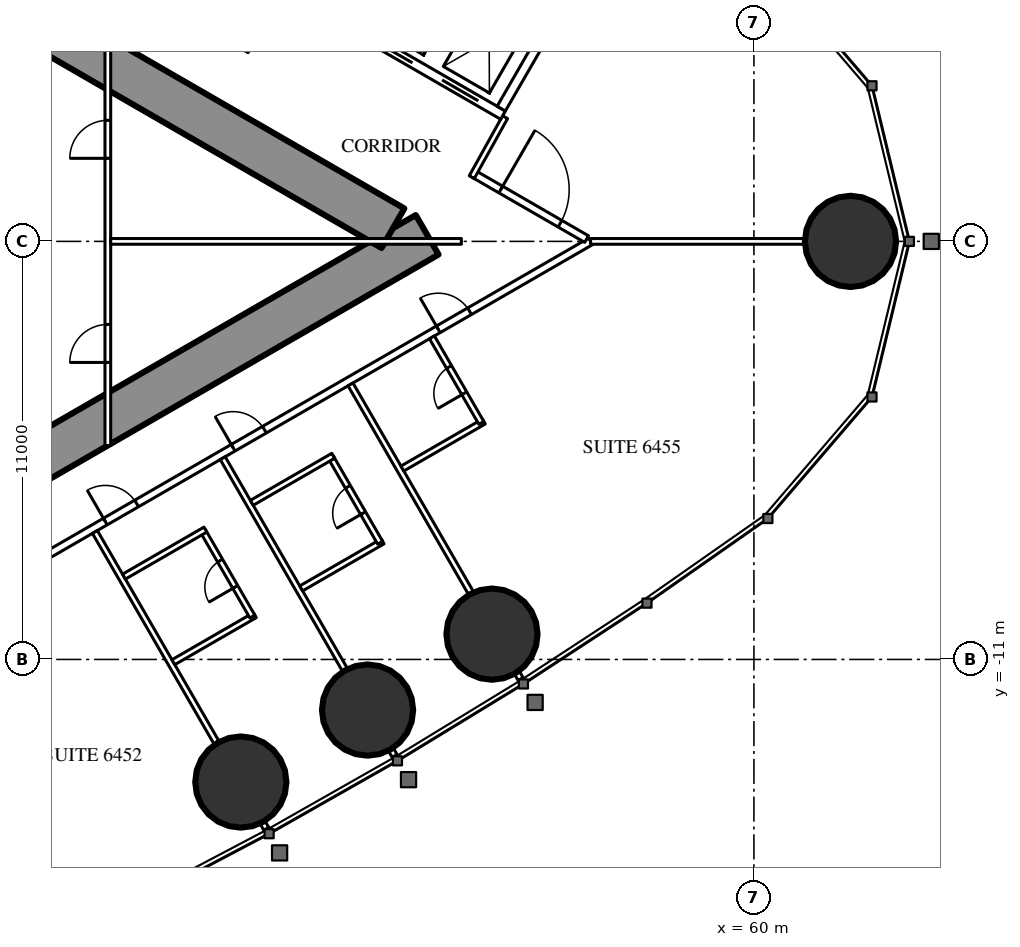
"""IFC4 building model, lengths in metres.
Left out: names, types, materials, properties, quantities, classifications, styles, units other than length and angle.
Written with IfcOpenShell. Run it as: python <this file> out.ifc"""

import sys

from ifc_helpers import new_model, si_unit, direction, frame, frame_2d, origin, origin_2d, place, context, subcontext, project, spatial, rectangle, circle, extrude, element, fill, save


model = new_model("IFC4")
c1 = context("Model", 3, precision=1e-05, world=origin(), true_north=direction((0.0, 1.0)))
c2 = subcontext(c1, "Body", "Model", "MODEL_VIEW")
j1 = project(units=[si_unit("LENGTHUNIT", "METRE"), si_unit("PLANEANGLEUNIT", "RADIAN")], contexts=[c1])
p1 = place(None, origin())
s1 = spatial("IfcSite", under=j1, at=p1, CompositionType="ELEMENT")
p2 = place(p1, origin())
s2 = spatial("IfcBuilding", under=s1, at=p2, CompositionType="ELEMENT")
p3 = place(p2, frame((0.0, 0.0, 240.5)))
s3 = spatial("IfcBuildingStorey", under=s2, at=p3, CompositionType="ELEMENT", Elevation=240.5)
for number, where, z_axis, x_axis in (
    (1, (62.542, 0.0, 0.0), (0.0, 0.0, 1.0), (1.0, 0.0, 0.0)),
    (2, (46.499, -14.226, 0.0), (0.0, 0.0, 1.0), (1.0, 0.0, 0.0)),
    (3, (49.834, -12.332, 0.0), (0.0, 0.0, 1.0), (1.0, 0.0, 0.0)),
    (4, (53.108, -10.334, 0.0), (0.0, 0.0, 1.0), (1.0, 0.0, 0.0)),
):
    element("IfcColumn", number, at=place(p3, frame(where, z_axis=z_axis, x_axis=x_axis)), inside=s3, PredefinedType="COLUMN", context=c2, shape_type="SweptSolid", body=[
        extrude(circle(Radius=1.2, at=origin_2d()), origin(), (0.0, 0.0, 1.0), 3.6),
    ])
p4 = place(p3, frame((27.2, -13.8, 0.0), z_axis=(0.0, 0.0, 1.0), x_axis=(0.866027159892, 0.499996958321, 0.0)))
e5 = element("IfcWall", 5, at=p4, inside=s3, PredefinedType="SHEAR", context=c2, shape_type="SweptSolid", body=[
    extrude(rectangle(XDim=27.947, YDim=1.2, at=frame_2d((13.973, 0.0))), origin(), (0.0, 0.0, 1.0), 3.6),
])
p5 = place(p4, frame((4.6, 0.0, 0.0)))
e6 = element("IfcOpeningElement", 6, at=p5, cuts=e5, PredefinedType="OPENING", context=c2, shape_type="SweptSolid", body=[
    extrude(rectangle(XDim=1.0, YDim=2.2, at=frame_2d((0.5, 1.1))), frame((0.0, 0.61, 0.0), z_axis=(0.0, -1.0, 0.0), x_axis=(1.0, 0.0, 0.0)), (0.0, 0.0, 1.0), 1.22),
])
p6 = place(p4, frame((13.395, 0.0, 0.0)))
e7 = element("IfcOpeningElement", 7, at=p6, cuts=e5, PredefinedType="OPENING", context=c2, shape_type="SweptSolid", body=[
    extrude(rectangle(XDim=1.8, YDim=2.2, at=frame_2d((0.9, 1.1))), frame((0.0, 0.61, 0.0), z_axis=(0.0, -1.0, 0.0), x_axis=(1.0, 0.0, 0.0)), (0.0, 0.0, 1.0), 1.22),
])
p7 = place(p3, frame((27.2, 13.8, 0.0), z_axis=(0.0, 0.0, 1.0), x_axis=(0.866024515034, -0.500001539357, 0.0)))
e8 = element("IfcWall", 8, at=p7, inside=s3, PredefinedType="SHEAR", context=c2, shape_type="SweptSolid", body=[
    extrude(rectangle(XDim=26.907, YDim=1.2, at=frame_2d((13.454, 0.0))), origin(), (0.0, 0.0, 1.0), 3.6),
])
p8 = place(p7, frame((4.6, 0.0, 0.0)))
e9 = element("IfcOpeningElement", 9, at=p8, cuts=e8, PredefinedType="OPENING", context=c2, shape_type="SweptSolid", body=[
    extrude(rectangle(XDim=1.0, YDim=2.2, at=frame_2d((0.5, 1.1))), frame((0.0, 0.61, 0.0), z_axis=(0.0, -1.0, 0.0), x_axis=(1.0, 0.0, 0.0)), (0.0, 0.0, 1.0), 1.22),
])
p9 = place(p7, frame((13.395, 0.0, 0.0)))
e10 = element("IfcOpeningElement", 10, at=p9, cuts=e8, PredefinedType="OPENING", context=c2, shape_type="SweptSolid", body=[
    extrude(rectangle(XDim=1.8, YDim=2.2, at=frame_2d((0.9, 1.1))), frame((0.0, 0.61, 0.0), z_axis=(0.0, -1.0, 0.0), x_axis=(1.0, 0.0, 0.0)), (0.0, 0.0, 1.0), 1.22),
])
p10 = place(p3, frame((28.959, -15.44, 0.0), z_axis=(0.0, 0.0, 1.0), x_axis=(0.866025227435, 0.500000305447, 0.0)))
e11 = element("IfcWall", 11, at=p10, inside=s3, PredefinedType="PARTITIONING", context=c2, shape_type="SweptSolid", body=[
    extrude(rectangle(XDim=30.88, YDim=0.2, at=frame_2d((15.44, 0.0))), origin(), (0.0, 0.0, 1.0), 3.35),
])
p11 = place(p10, frame((1.494, 0.0, 0.0)))
e12 = element("IfcOpeningElement", 12, at=p11, cuts=e11, PredefinedType="OPENING", context=c2, shape_type="SweptSolid", body=[
    extrude(rectangle(XDim=1.8, YDim=2.03, at=frame_2d((0.9, 1.015))), frame((0.0, 0.11, 0.0), z_axis=(0.0, -1.0, 0.0), x_axis=(1.0, 0.0, 0.0)), (0.0, 0.0, 1.0), 0.22),
])
p12 = place(p10, frame((7.687, 0.0, 0.0)))
e13 = element("IfcOpeningElement", 13, at=p12, cuts=e11, PredefinedType="OPENING", context=c2, shape_type="SweptSolid", body=[
    extrude(rectangle(XDim=1.0, YDim=2.2, at=frame_2d((0.5, 1.1))), frame((0.0, 0.11, 0.0), z_axis=(0.0, -1.0, 0.0), x_axis=(1.0, 0.0, 0.0)), (0.0, 0.0, 1.0), 0.22),
])
p13 = place(p10, frame((16.137, 0.0, 0.0)))
e14 = element("IfcOpeningElement", 14, at=p13, cuts=e11, PredefinedType="OPENING", context=c2, shape_type="SweptSolid", body=[
    extrude(rectangle(XDim=0.95, YDim=2.2, at=frame_2d((0.475, 1.1))), frame((0.0, 0.11, 0.0), z_axis=(0.0, -1.0, 0.0), x_axis=(1.0, 0.0, 0.0)), (0.0, 0.0, 1.0), 0.22),
])
p14 = place(p10, frame((20.021, 0.0, 0.0)))
e15 = element("IfcOpeningElement", 15, at=p14, cuts=e11, PredefinedType="OPENING", context=c2, shape_type="SweptSolid", body=[
    extrude(rectangle(XDim=0.95, YDim=2.2, at=frame_2d((0.475, 1.1))), frame((0.0, 0.11, 0.0), z_axis=(0.0, -1.0, 0.0), x_axis=(1.0, 0.0, 0.0)), (0.0, 0.0, 1.0), 0.22),
])
p15 = place(p10, frame((26.253, 0.0, 0.0)))
e16 = element("IfcOpeningElement", 16, at=p15, cuts=e11, PredefinedType="OPENING", context=c2, shape_type="SweptSolid", body=[
    extrude(rectangle(XDim=0.95, YDim=2.2, at=frame_2d((0.475, 1.1))), frame((0.0, 0.11, 0.0), z_axis=(0.0, -1.0, 0.0), x_axis=(1.0, 0.0, 0.0)), (0.0, 0.0, 1.0), 0.22),
])
p16 = place(p3, frame((42.66, -7.646, 0.0), z_axis=(0.0, 0.0, 1.0), x_axis=(0.499996592859, -0.866027370889, 0.0)))
e17 = element("IfcWall", 17, at=p16, inside=s3, PredefinedType="PARTITIONING", context=c2, shape_type="SweptSolid", body=[
    extrude(rectangle(XDim=6.398, YDim=0.15, at=frame_2d((3.199, 0.0))), origin(), (0.0, 0.0, 1.0), 2.45),
])
p17 = place(p3, frame((47.079, -15.3, 0.0), z_axis=(0.0, 0.0, 1.0), x_axis=(0.499212083968, -0.866479829667, 0.0)))
e18 = element("IfcWall", 18, at=p17, inside=s3, PredefinedType="PARTITIONING", context=c2, shape_type="SweptSolid", body=[
    extrude(rectangle(XDim=0.179, YDim=0.15, at=frame_2d((0.09, 0.0))), origin(), (0.0, 0.0, 1.0), 2.45),
])
p18 = place(p3, frame((46.023, -5.704, 0.0), z_axis=(0.0, 0.0, 1.0), x_axis=(0.499984478165, -0.866034365135, 0.0)))
e19 = element("IfcWall", 19, at=p18, inside=s3, PredefinedType="PARTITIONING", context=c2, shape_type="SweptSolid", body=[
    extrude(rectangle(XDim=6.426, YDim=0.15, at=frame_2d((3.213, 0.0))), origin(), (0.0, 0.0, 1.0), 2.45),
])
p19 = place(p3, frame((50.456, -13.382, 0.0), z_axis=(0.0, 0.0, 1.0), x_axis=(0.500661834965, -0.865642955848, 0.0)))
e20 = element("IfcWall", 20, at=p19, inside=s3, PredefinedType="PARTITIONING", context=c2, shape_type="SweptSolid", body=[
    extrude(rectangle(XDim=0.18, YDim=0.15, at=frame_2d((0.09, 0.0))), origin(), (0.0, 0.0, 1.0), 2.45),
])
p20 = place(p3, frame((49.385, -3.763, 0.0), z_axis=(0.0, 0.0, 1.0), x_axis=(0.499999447814, -0.866025722589, 0.0)))
e21 = element("IfcWall", 21, at=p20, inside=s3, PredefinedType="PARTITIONING", context=c2, shape_type="SweptSolid", body=[
    extrude(rectangle(XDim=6.333, YDim=0.15, at=frame_2d((3.166, 0.0))), origin(), (0.0, 0.0, 1.0), 2.45),
])
p21 = place(p3, frame((53.771, -11.36, 0.0), z_axis=(0.0, 0.0, 1.0), x_axis=(0.499524978789, -0.866299483762, 0.0)))
e22 = element("IfcWall", 22, at=p21, inside=s3, PredefinedType="PARTITIONING", context=c2, shape_type="SweptSolid", body=[
    extrude(rectangle(XDim=0.178, YDim=0.15, at=frame_2d((0.089, 0.0))), origin(), (0.0, 0.0, 1.0), 2.45),
])
p22 = place(p3, frame((55.702, 0.0, 0.0), z_axis=(0.0, 0.0, 1.0), x_axis=(1.0, 0.0, 0.0)))
e23 = element("IfcWall", 23, at=p22, inside=s3, PredefinedType="PARTITIONING", context=c2, shape_type="SweptSolid", body=[
    extrude(rectangle(XDim=5.619, YDim=0.15, at=frame_2d((2.81, 0.0))), origin(), (0.0, 0.0, 1.0), 2.45),
])
p23 = place(p3, frame((52.639, 1.769, 0.0), z_axis=(0.0, 0.0, 1.0), x_axis=(0.866027340901, -0.4999966448, 0.0)))
e24 = element("IfcWall", 24, at=p23, inside=s3, PredefinedType="PARTITIONING", context=c2, shape_type="SweptSolid", body=[
    extrude(rectangle(XDim=3.417, YDim=0.2, at=frame_2d((1.708, 0.0))), origin(), (0.0, 0.0, 1.0), 3.35),
])
p24 = place(p23, frame((0.809, 0.0, 0.0)))
e25 = element("IfcOpeningElement", 25, at=p24, cuts=e24, PredefinedType="OPENING", context=c2, shape_type="SweptSolid", body=[
    extrude(rectangle(XDim=1.8, YDim=2.2, at=frame_2d((0.9, 1.1))), frame((0.0, 0.11, 0.0), z_axis=(0.0, -1.0, 0.0), x_axis=(1.0, 0.0, 0.0)), (0.0, 0.0, 1.0), 0.22),
])
p25 = place(p3, frame((47.606, 6.642, 0.0), z_axis=(0.0, 0.0, 1.0), x_axis=(-0.51353662755, -0.858067673418, 0.0)))
e26 = element("IfcWall", 26, at=p25, inside=s3, PredefinedType="PARTITIONING", context=c2, shape_type="SweptSolid", body=[
    extrude(rectangle(XDim=1.91, YDim=0.15, at=frame_2d((0.955, 0.0))), origin(), (0.0, 0.0, 1.0), 3.35),
])
p26 = place(p3, frame((52.576, 1.689, 0.0), z_axis=(0.0, 0.0, 1.0), x_axis=(0.485424724123, 0.874278466629, 0.0)))
e27 = element("IfcWall", 27, at=p26, inside=s3, PredefinedType="PARTITIONING", context=c2, shape_type="SweptSolid", body=[
    extrude(rectangle(XDim=1.805, YDim=0.15, at=frame_2d((0.903, 0.0))), origin(), (0.0, 0.0, 1.0), 3.35),
])
p27 = place(p3, frame((44.725, -11.072, 0.0), z_axis=(0.0, 0.0, 1.0), x_axis=(0.866006523861, 0.500032699561, 0.0)))
e28 = element("IfcWall", 28, at=p27, inside=s3, PredefinedType="PARTITIONING", context=c2, shape_type="SweptSolid", body=[
    extrude(rectangle(XDim=2.475, YDim=0.15, at=frame_2d((1.237, 0.0))), origin(), (0.0, 0.0, 1.0), 3.35),
])
p28 = place(p3, frame((45.503, -7.621, 0.0), z_axis=(0.0, 0.0, 1.0), x_axis=(0.500006934395, -0.866021400173, 0.0)))
e29 = element("IfcWall", 29, at=p28, inside=s3, PredefinedType="PARTITIONING", context=c2, shape_type="SweptSolid", body=[
    extrude(rectangle(XDim=2.6, YDim=0.15, at=frame_2d((1.3, 0.0))), origin(), (0.0, 0.0, 1.0), 3.35),
])
p29 = place(p28, frame((0.9, 0.0, 0.0)))
e30 = element("IfcOpeningElement", 30, at=p29, cuts=e29, PredefinedType="OPENING", context=c2, shape_type="SweptSolid", body=[
    extrude(rectangle(XDim=0.8, YDim=2.2, at=frame_2d((0.4, 1.1))), frame((0.0, 0.085, 0.0), z_axis=(0.0, -1.0, 0.0), x_axis=(1.0, 0.0, 0.0)), (0.0, 0.0, 1.0), 0.17),
])
for number, where, z_axis, x_axis in (
    (31, (43.425, -8.821, 0.0), (0.0, 0.0, 1.0), (0.866, 0.5, 0.0)),
    (32, (48.088, -9.13, 0.0), (0.0, 0.0, 1.0), (0.866, 0.5, 0.0)),
):
    element("IfcWall", number, at=place(p3, frame(where, z_axis=z_axis, x_axis=x_axis)), inside=s3, PredefinedType="PARTITIONING", context=c2, shape_type="SweptSolid", body=[
        extrude(rectangle(XDim=2.475, YDim=0.15, at=frame_2d((1.237, 0.0))), origin(), (0.0, 0.0, 1.0), 3.35),
    ])
p30 = place(p3, frame((48.866, -5.679, 0.0), z_axis=(0.0, 0.0, 1.0), x_axis=(0.500006934395, -0.866021400173, 0.0)))
e33 = element("IfcWall", 33, at=p30, inside=s3, PredefinedType="PARTITIONING", context=c2, shape_type="SweptSolid", body=[
    extrude(rectangle(XDim=2.6, YDim=0.15, at=frame_2d((1.3, 0.0))), origin(), (0.0, 0.0, 1.0), 3.35),
])
p31 = place(p30, frame((0.9, 0.0, 0.0)))
e34 = element("IfcOpeningElement", 34, at=p31, cuts=e33, PredefinedType="OPENING", context=c2, shape_type="SweptSolid", body=[
    extrude(rectangle(XDim=0.8, YDim=2.2, at=frame_2d((0.4, 1.1))), frame((0.0, 0.085, 0.0), z_axis=(0.0, -1.0, 0.0), x_axis=(1.0, 0.0, 0.0)), (0.0, 0.0, 1.0), 0.17),
])
p32 = place(p3, frame((46.788, -6.879, 0.0), z_axis=(0.0, 0.0, 1.0), x_axis=(0.866006523861, 0.500032699561, 0.0)))
e35 = element("IfcWall", 35, at=p32, inside=s3, PredefinedType="PARTITIONING", context=c2, shape_type="SweptSolid", body=[
    extrude(rectangle(XDim=2.475, YDim=0.15, at=frame_2d((1.237, 0.0))), origin(), (0.0, 0.0, 1.0), 3.35),
])
p33 = place(p3, frame((50.75, -5.977, 0.0), z_axis=(0.0, 0.0, 1.0), x_axis=(0.866031185235, 0.4999899861, 0.0)))
e36 = element("IfcWall", 36, at=p33, inside=s3, PredefinedType="PARTITIONING", context=c2, shape_type="SweptSolid", body=[
    extrude(rectangle(XDim=2.475, YDim=0.15, at=frame_2d((1.238, 0.0))), origin(), (0.0, 0.0, 1.0), 3.35),
])
p34 = place(p3, frame((51.529, -2.525, 0.0), z_axis=(0.0, 0.0, 1.0), x_axis=(0.500006934395, -0.866021400173, 0.0)))
e37 = element("IfcWall", 37, at=p34, inside=s3, PredefinedType="PARTITIONING", context=c2, shape_type="SweptSolid", body=[
    extrude(rectangle(XDim=2.6, YDim=0.15, at=frame_2d((1.3, 0.0))), origin(), (0.0, 0.0, 1.0), 3.35),
])
p35 = place(p34, frame((0.9, 0.0, 0.0)))
e38 = element("IfcOpeningElement", 38, at=p35, cuts=e37, PredefinedType="OPENING", context=c2, shape_type="SweptSolid", body=[
    extrude(rectangle(XDim=0.8, YDim=2.2, at=frame_2d((0.4, 1.1))), frame((0.0, 0.085, 0.0), z_axis=(0.0, -1.0, 0.0), x_axis=(1.0, 0.0, 0.0)), (0.0, 0.0, 1.0), 0.17),
])
p36 = place(p3, frame((43.0, -5.371, 0.0), z_axis=(0.0, 0.0, 1.0), x_axis=(0.0, 1.0, 0.0)))
e39 = element("IfcWall", 39, at=p36, inside=s3, PredefinedType="PARTITIONING", context=c2, shape_type="SweptSolid", body=[
    extrude(rectangle(XDim=10.741, YDim=0.15, at=frame_2d((5.371, 0.0))), origin(), (0.0, 0.0, 1.0), 3.35),
])
p37 = place(p36, frame((2.185, 0.0, 0.0)))
e40 = element("IfcOpeningElement", 40, at=p37, cuts=e39, PredefinedType="OPENING", context=c2, shape_type="SweptSolid", body=[
    extrude(rectangle(XDim=1.0, YDim=2.2, at=frame_2d((0.5, 1.1))), frame((0.0, 0.085, 0.0), z_axis=(0.0, -1.0, 0.0), x_axis=(1.0, 0.0, 0.0)), (0.0, 0.0, 1.0), 0.17),
])
p38 = place(p36, frame((7.556, 0.0, 0.0)))
e41 = element("IfcOpeningElement", 41, at=p38, cuts=e39, PredefinedType="OPENING", context=c2, shape_type="SweptSolid", body=[
    extrude(rectangle(XDim=1.0, YDim=2.2, at=frame_2d((0.5, 1.1))), frame((0.0, 0.085, 0.0), z_axis=(0.0, -1.0, 0.0), x_axis=(1.0, 0.0, 0.0)), (0.0, 0.0, 1.0), 0.17),
])
p39 = place(p3, frame((43.075, 0.0, 0.0), z_axis=(0.0, 0.0, 1.0), x_axis=(1.0, 0.0, 0.0)))
e42 = element("IfcWall", 42, at=p39, inside=s3, PredefinedType="PARTITIONING", context=c2, shape_type="SweptSolid", body=[
    extrude(rectangle(XDim=9.227, YDim=0.15, at=frame_2d((4.614, 0.0))), origin(), (0.0, 0.0, 1.0), 2.45),
])
p40 = place(p3, frame((47.681, 6.622, 0.0), z_axis=(0.0, 0.0, 1.0), x_axis=(0.86603344179, -0.499986077507, 0.0)))
e43 = element("IfcWall", 43, at=p40, inside=s3, PredefinedType="PARTITIONING", context=c2, shape_type="SweptSolid", body=[
    extrude(rectangle(XDim=6.6, YDim=0.25, at=frame_2d((3.3, 0.0))), origin(), (0.0, 0.0, 1.0), 3.35),
])
p41 = place(p40, frame((0.75, 0.0, 0.0)))
e44 = element("IfcOpeningElement", 44, at=p41, cuts=e43, PredefinedType="OPENING", context=c2, shape_type="SweptSolid", body=[
    extrude(rectangle(XDim=1.1, YDim=2.2, at=frame_2d((0.55, 1.1))), frame((0.0, 0.135, 0.0), z_axis=(0.0, -1.0, 0.0), x_axis=(1.0, 0.0, 0.0)), (0.0, 0.0, 1.0), 0.27),
])
p42 = place(p40, frame((2.75, 0.0, 0.0)))
e45 = element("IfcOpeningElement", 45, at=p42, cuts=e43, PredefinedType="OPENING", context=c2, shape_type="SweptSolid", body=[
    extrude(rectangle(XDim=1.1, YDim=2.2, at=frame_2d((0.55, 1.1))), frame((0.0, 0.135, 0.0), z_axis=(0.0, -1.0, 0.0), x_axis=(1.0, 0.0, 0.0)), (0.0, 0.0, 1.0), 0.27),
])
p43 = place(p40, frame((4.75, 0.0, 0.0)))
e46 = element("IfcOpeningElement", 46, at=p43, cuts=e43, PredefinedType="OPENING", context=c2, shape_type="SweptSolid", body=[
    extrude(rectangle(XDim=1.1, YDim=2.2, at=frame_2d((0.55, 1.1))), frame((0.0, 0.135, 0.0), z_axis=(0.0, -1.0, 0.0), x_axis=(1.0, 0.0, 0.0)), (0.0, 0.0, 1.0), 0.27),
])
p44 = place(p3, frame((53.352, 3.493, 0.0), z_axis=(0.0, 0.0, 1.0), x_axis=(0.499872130319, 0.866099216793, 0.0)))
e47 = element("IfcWall", 47, at=p44, inside=s3, PredefinedType="PARTITIONING", context=c2, shape_type="SweptSolid", body=[
    extrude(rectangle(XDim=3.2, YDim=0.25, at=frame_2d((1.6, 0.0))), origin(), (0.0, 0.0, 1.0), 3.35),
])
p45 = place(p29, origin())
e48 = element("IfcDoor", 48, at=p45, inside=s3, OperationType="SINGLE_SWING_RIGHT", PredefinedType="DOOR", context=c2, shape_type="SweptSolid", body=[
    extrude(rectangle(XDim=0.8, YDim=2.2, at=frame_2d((0.4, 1.1))), frame((0.0, 0.025, 0.0), z_axis=(0.0, -1.0, 0.0), x_axis=(1.0, 0.0, 0.0)), (0.0, 0.0, 1.0), 0.05),
])
fill(e30, e48)
p46 = place(p13, origin())
e49 = element("IfcDoor", 49, at=p46, inside=s3, OperationType="SINGLE_SWING_LEFT", PredefinedType="DOOR", context=c2, shape_type="SweptSolid", body=[
    extrude(rectangle(XDim=0.95, YDim=2.2, at=frame_2d((0.475, 1.1))), frame((0.0, 0.025, 0.0), z_axis=(0.0, -1.0, 0.0), x_axis=(1.0, 0.0, 0.0)), (0.0, 0.0, 1.0), 0.05),
])
fill(e14, e49)
p47 = place(p31, origin())
e50 = element("IfcDoor", 50, at=p47, inside=s3, OperationType="SINGLE_SWING_RIGHT", PredefinedType="DOOR", context=c2, shape_type="SweptSolid", body=[
    extrude(rectangle(XDim=0.8, YDim=2.2, at=frame_2d((0.4, 1.1))), frame((0.0, 0.025, 0.0), z_axis=(0.0, -1.0, 0.0), x_axis=(1.0, 0.0, 0.0)), (0.0, 0.0, 1.0), 0.05),
])
fill(e34, e50)
p48 = place(p14, origin())
e51 = element("IfcDoor", 51, at=p48, inside=s3, OperationType="SINGLE_SWING_LEFT", PredefinedType="DOOR", context=c2, shape_type="SweptSolid", body=[
    extrude(rectangle(XDim=0.95, YDim=2.2, at=frame_2d((0.475, 1.1))), frame((0.0, 0.025, 0.0), z_axis=(0.0, -1.0, 0.0), x_axis=(1.0, 0.0, 0.0)), (0.0, 0.0, 1.0), 0.05),
])
fill(e15, e51)
p49 = place(p35, origin())
e52 = element("IfcDoor", 52, at=p49, inside=s3, OperationType="SINGLE_SWING_RIGHT", PredefinedType="DOOR", context=c2, shape_type="SweptSolid", body=[
    extrude(rectangle(XDim=0.8, YDim=2.2, at=frame_2d((0.4, 1.1))), frame((0.0, 0.025, 0.0), z_axis=(0.0, -1.0, 0.0), x_axis=(1.0, 0.0, 0.0)), (0.0, 0.0, 1.0), 0.05),
])
fill(e38, e52)
p50 = place(p15, origin())
e53 = element("IfcDoor", 53, at=p50, inside=s3, OperationType="SINGLE_SWING_LEFT", PredefinedType="DOOR", context=c2, shape_type="SweptSolid", body=[
    extrude(rectangle(XDim=0.95, YDim=2.2, at=frame_2d((0.475, 1.1))), frame((0.0, 0.025, 0.0), z_axis=(0.0, -1.0, 0.0), x_axis=(1.0, 0.0, 0.0)), (0.0, 0.0, 1.0), 0.05),
])
fill(e16, e53)
p51 = place(p24, origin())
e54 = element("IfcDoor", 54, at=p51, inside=s3, OperationType="DOUBLE_DOOR_SINGLE_SWING", PredefinedType="DOOR", context=c2, shape_type="SweptSolid", body=[
    extrude(rectangle(XDim=1.8, YDim=2.2, at=frame_2d((0.9, 1.1))), frame((0.0, 0.025, 0.0), z_axis=(0.0, -1.0, 0.0), x_axis=(1.0, 0.0, 0.0)), (0.0, 0.0, 1.0), 0.05),
])
fill(e25, e54)
p52 = place(p37, origin())
e55 = element("IfcDoor", 55, at=p52, inside=s3, OperationType="SINGLE_SWING_LEFT", PredefinedType="DOOR", context=c2, shape_type="SweptSolid", body=[
    extrude(rectangle(XDim=1.0, YDim=2.2, at=frame_2d((0.5, 1.1))), frame((0.0, 0.025, 0.0), z_axis=(0.0, -1.0, 0.0), x_axis=(1.0, 0.0, 0.0)), (0.0, 0.0, 1.0), 0.05),
])
fill(e40, e55)
p53 = place(p38, origin())
e56 = element("IfcDoor", 56, at=p53, inside=s3, OperationType="SINGLE_SWING_LEFT", PredefinedType="DOOR", context=c2, shape_type="SweptSolid", body=[
    extrude(rectangle(XDim=1.0, YDim=2.2, at=frame_2d((0.5, 1.1))), frame((0.0, 0.025, 0.0), z_axis=(0.0, -1.0, 0.0), x_axis=(1.0, 0.0, 0.0)), (0.0, 0.0, 1.0), 0.05),
])
fill(e41, e56)
p54 = place(p42, origin())
e57 = element("IfcDoor", 57, at=p54, inside=s3, OperationType="DOUBLE_DOOR_SLIDING", PredefinedType="USERDEFINED", context=c2, shape_type="SweptSolid", body=[
    extrude(rectangle(XDim=1.1, YDim=2.2, at=frame_2d((0.55, 1.1))), frame((0.0, 0.025, 0.0), z_axis=(0.0, -1.0, 0.0), x_axis=(1.0, 0.0, 0.0)), (0.0, 0.0, 1.0), 0.05),
])
fill(e45, e57)
p55 = place(p43, origin())
e58 = element("IfcDoor", 58, at=p55, inside=s3, OperationType="DOUBLE_DOOR_SLIDING", PredefinedType="USERDEFINED", context=c2, shape_type="SweptSolid", body=[
    extrude(rectangle(XDim=1.1, YDim=2.2, at=frame_2d((0.55, 1.1))), frame((0.0, 0.025, 0.0), z_axis=(0.0, -1.0, 0.0), x_axis=(1.0, 0.0, 0.0)), (0.0, 0.0, 1.0), 0.05),
])
fill(e46, e58)
save(model, sys.argv[1])
